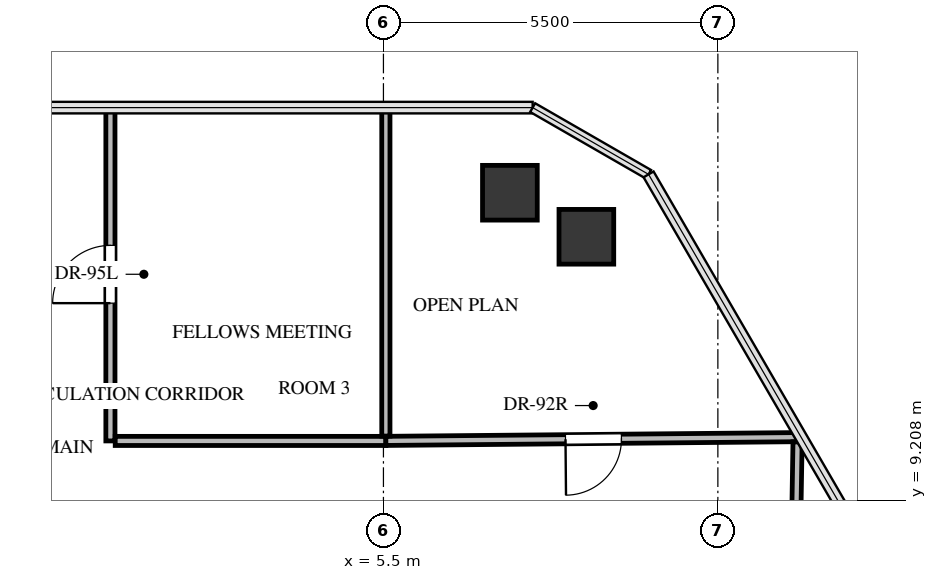
"""IFC4 building model, lengths in metres.
Left out: names, types, materials, properties, quantities, classifications, styles, units other than length and angle.
Written with IfcOpenShell. Run it as: python <this file> out.ifc"""

import sys

from ifc_helpers import new_model, si_unit, direction, frame, frame_2d, origin, origin_2d, place, context, subcontext, project, spatial, rectangle, extrude, source, transform, mapped, element, fill, save


model = new_model("IFC4")
c1 = context("Model", 3, precision=1e-05, world=origin(), true_north=direction((0.0, 1.0)))
c2 = subcontext(c1, "Body", "Model", "MODEL_VIEW")
j1 = project(units=[si_unit("LENGTHUNIT", "METRE"), si_unit("PLANEANGLEUNIT", "RADIAN")], contexts=[c1])
p1 = place(None, origin())
s1 = spatial("IfcSite", under=j1, at=p1, CompositionType="ELEMENT")
p2 = place(p1, origin())
s2 = spatial("IfcBuilding", under=s1, at=p2, CompositionType="ELEMENT")
p3 = place(p2, frame((0.0, 0.0, 258.1)))
s3 = spatial("IfcBuildingStorey", under=s2, at=p3, CompositionType="ELEMENT", Elevation=258.1)
m1 = source(origin(), c2, "Body", "SweptSolid", [
    extrude(rectangle(XDim=0.9, YDim=0.9, at=origin_2d()), origin(), (0.0, 0.0, 1.0), 3.4),
])
for number, where, z_axis, x_axis in (
    (1, (7.58, 14.262, -0.24), (0.0, 0.0, 1.0), (1.0, 0.0, 0.0)),
    (2, (8.837, 13.538, -0.24), (0.0, 0.0, 1.0), (1.0, 0.0, 0.0)),
):
    element("IfcColumn", number, at=place(p3, frame(where, z_axis=z_axis, x_axis=x_axis)), inside=s3, PredefinedType="COLUMN", context=c2, shape_type="MappedRepresentation", body=[
        mapped(m1, transform((0.0, 0.0, 0.0), x_axis=(1.0, 0.0, 0.0), y_axis=(0.0, 1.0, 0.0), z_axis=(0.0, 0.0, 1.0), scale=1.0)),
    ])
p4 = place(p3, frame((1.01, 10.18, 0.0), z_axis=(0.0, 0.0, 1.0), x_axis=(0.0, 1.0, 0.0)))
e3 = element("IfcWall", 3, at=p4, inside=s3, PredefinedType="PARTITIONING", context=c2, shape_type="SweptSolid", body=[
    extrude(rectangle(XDim=5.482, YDim=0.15, at=frame_2d((2.741, 0.0))), origin(), (0.0, 0.0, 1.0), 2.499),
])
p5 = place(p4, frame((2.266, 0.0, 0.0)))
e4 = element("IfcOpeningElement", 4, at=p5, cuts=e3, PredefinedType="OPENING", context=c2, shape_type="SweptSolid", body=[
    extrude(rectangle(XDim=0.95, YDim=2.1, at=frame_2d((0.475, 1.05))), frame((0.0, 0.085, 0.0), z_axis=(0.0, -1.0, 0.0), x_axis=(1.0, 0.0, 0.0)), (0.0, 0.0, 1.0), 0.17),
])
p6 = place(p3, frame((5.54, 10.18, 0.0), z_axis=(0.0, 0.0, 1.0), x_axis=(-1.0, 0.0, 0.0)))
e5 = element("IfcWall", 5, at=p6, inside=s3, PredefinedType="PARTITIONING", context=c2, shape_type="SweptSolid", body=[
    extrude(rectangle(XDim=4.451, YDim=0.15, at=frame_2d((2.226, 0.0))), origin(), (0.0, 0.0, 1.0), 2.708),
])
p7 = place(p3, frame((12.368, 10.243, 0.0), z_axis=(0.0, 0.0, 1.0), x_axis=(-0.999958440586, -0.009116858034, 0.0)))
e6 = element("IfcWall", 6, at=p7, inside=s3, PredefinedType="PARTITIONING", context=c2, shape_type="SweptSolid", body=[
    extrude(rectangle(XDim=6.829, YDim=0.15, at=frame_2d((3.414, 0.0))), origin(), (0.0, 0.0, 1.0), 2.401),
])
p8 = place(p7, frame((2.954, 0.0, 0.0)))
e7 = element("IfcOpeningElement", 7, at=p8, cuts=e6, PredefinedType="OPENING", context=c2, shape_type="SweptSolid", body=[
    extrude(rectangle(XDim=0.92, YDim=2.1, at=frame_2d((0.46, 1.05))), frame((0.0, 0.085, 0.0), z_axis=(0.0, -1.0, 0.0), x_axis=(1.0, 0.0, 0.0)), (0.0, 0.0, 1.0), 0.17),
])
p9 = place(p3, frame((12.181, 2.49, 0.0), z_axis=(0.0, 0.0, 1.0), x_axis=(0.016828669653, 0.999858387912, 0.0)))
e8 = element("IfcWall", 8, at=p9, inside=s3, PredefinedType="PARTITIONING", context=c2, shape_type="SweptSolid", body=[
    extrude(rectangle(XDim=7.674, YDim=0.15, at=frame_2d((3.837, 0.0))), origin(), (0.0, 0.0, 1.0), 2.499),
])
p10 = place(p9, frame((3.377, 0.0, 0.0)))
e9 = element("IfcOpeningElement", 9, at=p10, cuts=e8, PredefinedType="OPENING", context=c2, shape_type="SweptSolid", body=[
    extrude(rectangle(XDim=0.92, YDim=2.1, at=frame_2d((0.46, 1.05))), frame((0.0, 0.085, 0.0), z_axis=(0.0, -1.0, 0.0), x_axis=(1.0, 0.0, 0.0)), (0.0, 0.0, 1.0), 0.17),
])
p11 = place(p3, frame((5.54, 15.662, 0.0), z_axis=(0.0, 0.0, 1.0), x_axis=(0.0, -1.0, 0.0)))
e10 = element("IfcWall", 10, at=p11, inside=s3, PredefinedType="PARTITIONING", context=c2, shape_type="SweptSolid", body=[
    extrude(rectangle(XDim=5.402, YDim=0.135, at=frame_2d((2.701, 0.0))), origin(), (0.0, 0.0, 1.0), 2.499),
])
m2 = source(origin(), c2, "Body", "SweptSolid", [
    extrude(rectangle(XDim=0.95, YDim=2.1, at=frame_2d((0.475, 1.05))), frame((0.0, 0.025, 0.0), z_axis=(0.0, -1.0, 0.0), x_axis=(1.0, 0.0, 0.0)), (0.0, 0.0, 1.0), 0.05),
])
p12 = place(p5, origin())
e11 = element("IfcDoor", 11, at=p12, inside=s3, OperationType="SINGLE_SWING_LEFT", PredefinedType="DOOR", context=c2, shape_type="MappedRepresentation", body=[
    mapped(m2, transform((0.0, 0.0, 0.0), x_axis=(1.0, 0.0, 0.0), y_axis=(0.0, 1.0, 0.0), z_axis=(0.0, 0.0, 1.0), scale=1.0)),
])
fill(e4, e11)
m3 = source(origin(), c2, "Body", "SweptSolid", [
    extrude(rectangle(XDim=0.92, YDim=2.1, at=frame_2d((0.46, 1.05))), frame((0.0, 0.025, 0.0), z_axis=(0.0, -1.0, 0.0), x_axis=(1.0, 0.0, 0.0)), (0.0, 0.0, 1.0), 0.05),
])
p13 = place(p8, origin())
e12 = element("IfcDoor", 12, at=p13, inside=s3, OperationType="SINGLE_SWING_RIGHT", PredefinedType="DOOR", context=c2, shape_type="MappedRepresentation", body=[
    mapped(m3, transform((0.0, 0.0, 0.0), x_axis=(1.0, 0.0, 0.0), y_axis=(0.0, 1.0, 0.0), z_axis=(0.0, 0.0, 1.0), scale=1.0)),
])
fill(e7, e12)
save(model, sys.argv[1])
